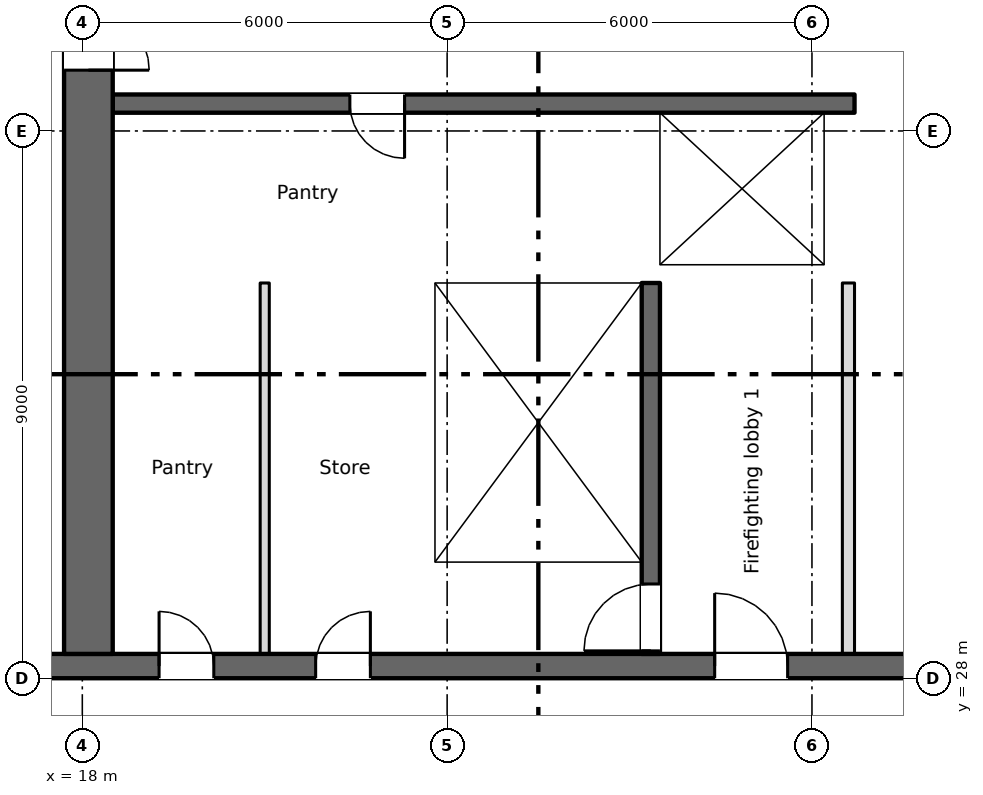
"""IFC4 building model, lengths in metres.
Left out: names, types, materials, properties, quantities, classifications, styles, units other than length and angle.
Written with IfcOpenShell. Run it as: python <this file> out.ifc"""

import sys

from ifc_helpers import new_model, si_unit, direction, frame, frame_2d, origin, place, context, subcontext, project, spatial, rectangle, extrude, element, fill, save


model = new_model("IFC4")
c1 = context("Model", 3, precision=1e-05, world=origin(), true_north=direction((0.0, 1.0)))
c2 = subcontext(c1, "Body", "Model", "MODEL_VIEW")
j1 = project(units=[si_unit("LENGTHUNIT", "METRE"), si_unit("PLANEANGLEUNIT", "RADIAN")], contexts=[c1])
p1 = place(None, origin())
s1 = spatial("IfcSite", under=j1, at=p1, CompositionType="ELEMENT")
p2 = place(p1, origin())
s2 = spatial("IfcBuilding", under=s1, at=p2, CompositionType="ELEMENT")
p3 = place(p2, frame((0.0, 0.0, 155.0)))
s3 = spatial("IfcBuildingStorey", under=s2, at=p3, CompositionType="ELEMENT", Elevation=155.0)
p4 = place(p3, frame((6.7, 28.2, 0.0), z_axis=(0.0, 0.0, 1.0), x_axis=(1.0, 0.0, 0.0)))
e1 = element("IfcWall", 1, at=p4, inside=s3, PredefinedType="SHEAR", context=c2, shape_type="SweptSolid", body=[
    extrude(rectangle(XDim=57.8, YDim=0.4, at=frame_2d((28.9, 0.0))), origin(), (0.0, 0.0, 1.0), 3.15),
])
p5 = place(p4, frame((12.562, 0.0, 0.0)))
e2 = element("IfcOpeningElement", 2, at=p5, cuts=e1, PredefinedType="OPENING", context=c2, shape_type="SweptSolid", body=[
    extrude(rectangle(XDim=0.9, YDim=2.1, at=frame_2d((0.45, 1.05))), frame((0.0, 0.21, 0.0), z_axis=(0.0, -1.0, 0.0), x_axis=(1.0, 0.0, 0.0)), (0.0, 0.0, 1.0), 0.42),
])
p6 = place(p4, frame((15.137, 0.0, 0.0)))
e3 = element("IfcOpeningElement", 3, at=p6, cuts=e1, PredefinedType="OPENING", context=c2, shape_type="SweptSolid", body=[
    extrude(rectangle(XDim=0.9, YDim=2.1, at=frame_2d((0.45, 1.05))), frame((0.0, 0.21, 0.0), z_axis=(0.0, -1.0, 0.0), x_axis=(1.0, 0.0, 0.0)), (0.0, 0.0, 1.0), 0.42),
])
p7 = place(p4, frame((49.85, 0.0, 0.0)))
e4 = element("IfcOpeningElement", 4, at=p7, cuts=e1, PredefinedType="OPENING", context=c2, shape_type="SweptSolid", body=[
    extrude(rectangle(XDim=0.9, YDim=2.1, at=frame_2d((0.45, 1.05))), frame((0.0, 0.21, 0.0), z_axis=(0.0, -1.0, 0.0), x_axis=(1.0, 0.0, 0.0)), (0.0, 0.0, 1.0), 0.42),
])
p8 = place(p4, frame((0.562, 0.0, 0.0)))
e5 = element("IfcOpeningElement", 5, at=p8, cuts=e1, PredefinedType="OPENING", context=c2, shape_type="SweptSolid", body=[
    extrude(rectangle(XDim=0.9, YDim=2.1, at=frame_2d((0.45, 1.05))), frame((0.0, 0.21, 0.0), z_axis=(0.0, -1.0, 0.0), x_axis=(1.0, 0.0, 0.0)), (0.0, 0.0, 1.0), 0.42),
])
p9 = place(p4, frame((2.137, 0.0, 0.0)))
e6 = element("IfcOpeningElement", 6, at=p9, cuts=e1, PredefinedType="OPENING", context=c2, shape_type="SweptSolid", body=[
    extrude(rectangle(XDim=0.9, YDim=2.1, at=frame_2d((0.45, 1.05))), frame((0.0, 0.21, 0.0), z_axis=(0.0, -1.0, 0.0), x_axis=(1.0, 0.0, 0.0)), (0.0, 0.0, 1.0), 0.42),
])
p10 = place(p4, frame((4.7, 0.0, 0.0)))
e7 = element("IfcOpeningElement", 7, at=p10, cuts=e1, PredefinedType="OPENING", context=c2, shape_type="SweptSolid", body=[
    extrude(rectangle(XDim=1.2, YDim=2.1, at=frame_2d((0.6, 1.05))), frame((0.0, 0.21, 0.0), z_axis=(0.0, -1.0, 0.0), x_axis=(1.0, 0.0, 0.0)), (0.0, 0.0, 1.0), 0.42),
])
p11 = place(p4, frame((31.7, 0.0, 0.0)))
e8 = element("IfcOpeningElement", 8, at=p11, cuts=e1, PredefinedType="OPENING", context=c2, shape_type="SweptSolid", body=[
    extrude(rectangle(XDim=1.2, YDim=2.1, at=frame_2d((0.6, 1.05))), frame((0.0, 0.21, 0.0), z_axis=(0.0, -1.0, 0.0), x_axis=(1.0, 0.0, 0.0)), (0.0, 0.0, 1.0), 0.42),
])
p12 = place(p4, frame((55.2, 0.0, 0.0)))
e9 = element("IfcOpeningElement", 9, at=p12, cuts=e1, PredefinedType="OPENING", context=c2, shape_type="SweptSolid", body=[
    extrude(rectangle(XDim=1.2, YDim=2.1, at=frame_2d((0.6, 1.05))), frame((0.0, 0.21, 0.0), z_axis=(0.0, -1.0, 0.0), x_axis=(1.0, 0.0, 0.0)), (0.0, 0.0, 1.0), 0.42),
])
p13 = place(p4, frame((21.7, 0.0, 0.0)))
e10 = element("IfcOpeningElement", 10, at=p13, cuts=e1, PredefinedType="OPENING", context=c2, shape_type="SweptSolid", body=[
    extrude(rectangle(XDim=1.2, YDim=2.1, at=frame_2d((0.6, 1.05))), frame((0.0, 0.21, 0.0), z_axis=(0.0, -1.0, 0.0), x_axis=(1.0, 0.0, 0.0)), (0.0, 0.0, 1.0), 0.42),
])
p14 = place(p4, frame((41.7, 0.0, 0.0)))
e11 = element("IfcOpeningElement", 11, at=p14, cuts=e1, PredefinedType="OPENING", context=c2, shape_type="SweptSolid", body=[
    extrude(rectangle(XDim=1.2, YDim=2.1, at=frame_2d((0.6, 1.05))), frame((0.0, 0.21, 0.0), z_axis=(0.0, -1.0, 0.0), x_axis=(1.0, 0.0, 0.0)), (0.0, 0.0, 1.0), 0.42),
])
p15 = place(p4, frame((24.85, 0.0, 0.0)))
e12 = element("IfcOpeningElement", 12, at=p15, cuts=e1, PredefinedType="OPENING", context=c2, shape_type="SweptSolid", body=[
    extrude(rectangle(XDim=2.4, YDim=2.1, at=frame_2d((1.2, 1.05))), frame((0.0, 0.21, 0.0), z_axis=(0.0, -1.0, 0.0), x_axis=(1.0, 0.0, 0.0)), (0.0, 0.0, 1.0), 0.42),
])
p16 = place(p4, frame((37.35, 0.0, 0.0)))
e13 = element("IfcOpeningElement", 13, at=p16, cuts=e1, PredefinedType="OPENING", context=c2, shape_type="SweptSolid", body=[
    extrude(rectangle(XDim=2.4, YDim=2.1, at=frame_2d((1.2, 1.05))), frame((0.0, 0.21, 0.0), z_axis=(0.0, -1.0, 0.0), x_axis=(1.0, 0.0, 0.0)), (0.0, 0.0, 1.0), 0.42),
])
p17 = place(p4, frame((7.95, 0.0, 0.0)))
e14 = element("IfcOpeningElement", 14, at=p17, cuts=e1, PredefinedType="OPENING", context=c2, shape_type="SweptSolid", body=[
    extrude(rectangle(XDim=2.4, YDim=2.1, at=frame_2d((1.2, 1.05))), frame((0.0, 0.21, 0.0), z_axis=(0.0, -1.0, 0.0), x_axis=(1.0, 0.0, 0.0)), (0.0, 0.0, 1.0), 0.42),
])
p18 = place(p4, frame((28.85, 0.0, 0.0)))
e15 = element("IfcOpeningElement", 15, at=p18, cuts=e1, PredefinedType="OPENING", context=c2, shape_type="SweptSolid", body=[
    extrude(rectangle(XDim=0.9, YDim=2.1, at=frame_2d((0.45, 1.05))), frame((0.0, 0.21, 0.0), z_axis=(0.0, -1.0, 0.0), x_axis=(1.0, 0.0, 0.0)), (0.0, 0.0, 1.0), 0.42),
])
p19 = place(p4, frame((34.85, 0.0, 0.0)))
e16 = element("IfcOpeningElement", 16, at=p19, cuts=e1, PredefinedType="OPENING", context=c2, shape_type="SweptSolid", body=[
    extrude(rectangle(XDim=0.9, YDim=2.1, at=frame_2d((0.45, 1.05))), frame((0.0, 0.21, 0.0), z_axis=(0.0, -1.0, 0.0), x_axis=(1.0, 0.0, 0.0)), (0.0, 0.0, 1.0), 0.42),
])
p20 = place(p3, frame((18.1, 28.4, 0.0), z_axis=(0.0, 0.0, 1.0), x_axis=(0.0, 1.0, 0.0)))
e17 = element("IfcWall", 17, at=p20, inside=s3, PredefinedType="SHEAR", context=c2, shape_type="SweptSolid", body=[
    extrude(rectangle(XDim=16.8, YDim=0.8, at=frame_2d((8.4, 0.0))), origin(), (0.0, 0.0, 1.0), 3.15),
])
p21 = place(p20, frame((9.6, 0.0, 0.0)))
e18 = element("IfcOpeningElement", 18, at=p21, cuts=e17, PredefinedType="OPENING", context=c2, shape_type="SweptSolid", body=[
    extrude(rectangle(XDim=2.0, YDim=2.1, at=frame_2d((1.0, 1.05))), frame((0.0, 0.41, 0.0), z_axis=(0.0, -1.0, 0.0), x_axis=(1.0, 0.0, 0.0)), (0.0, 0.0, 1.0), 0.82),
])
p22 = place(p20, frame((15.35, 0.0, 0.0)))
e19 = element("IfcOpeningElement", 19, at=p22, cuts=e17, PredefinedType="OPENING", context=c2, shape_type="SweptSolid", body=[
    extrude(rectangle(XDim=1.2, YDim=2.1, at=frame_2d((0.6, 1.05))), frame((0.0, 0.41, 0.0), z_axis=(0.0, -1.0, 0.0), x_axis=(1.0, 0.0, 0.0)), (0.0, 0.0, 1.0), 0.82),
])
p23 = place(p3, frame((23.65, 28.4, 0.0), z_axis=(0.0, 0.0, 1.0), x_axis=(0.0, 1.0, 0.0)))
e20 = element("IfcWall", 20, at=p23, inside=s3, PredefinedType="SHEAR", context=c2, shape_type="SweptSolid", body=[
    extrude(rectangle(XDim=6.1, YDim=0.3, at=frame_2d((3.05, 0.0))), origin(), (0.0, 0.0, 1.0), 3.15),
])
p24 = place(p3, frame((27.35, 28.4, 0.0), z_axis=(0.0, 0.0, 1.0), x_axis=(0.0, 1.0, 0.0)))
e21 = element("IfcWall", 21, at=p24, inside=s3, PredefinedType="SHEAR", context=c2, shape_type="SweptSolid", body=[
    extrude(rectangle(XDim=6.1, YDim=0.3, at=frame_2d((3.05, 0.0))), origin(), (0.0, 0.0, 1.0), 3.15),
])
p25 = place(p24, frame((0.05, 0.0, 0.0)))
e22 = element("IfcOpeningElement", 22, at=p25, cuts=e21, PredefinedType="OPENING", context=c2, shape_type="SweptSolid", body=[
    extrude(rectangle(XDim=1.1, YDim=2.1, at=frame_2d((0.55, 1.05))), frame((0.0, 0.16, 0.0), z_axis=(0.0, -1.0, 0.0), x_axis=(1.0, 0.0, 0.0)), (0.0, 0.0, 1.0), 0.32),
])
p26 = place(p3, frame((18.5, 34.65, 0.0), z_axis=(0.0, 0.0, 1.0), x_axis=(1.0, 0.0, 0.0)))
e23 = element("IfcWall", 23, at=p26, inside=s3, PredefinedType="SHEAR", context=c2, shape_type="SweptSolid", body=[
    extrude(rectangle(XDim=12.2, YDim=0.3, at=frame_2d((6.1, 0.0))), origin(), (0.0, 0.0, 1.0), 3.15),
])
p27 = place(p26, frame((9.8, 0.0, 0.0)))
e24 = element("IfcOpeningElement", 24, at=p27, cuts=e23, PredefinedType="OPENING", context=c2, shape_type="SweptSolid", body=[
    extrude(rectangle(XDim=1.1, YDim=2.1, at=frame_2d((0.55, 1.05))), frame((0.0, 0.16, 0.0), z_axis=(0.0, -1.0, 0.0), x_axis=(1.0, 0.0, 0.0)), (0.0, 0.0, 1.0), 0.32),
])
p28 = place(p3, frame((30.7, 37.45, 0.0), z_axis=(0.0, 0.0, 1.0), x_axis=(-1.0, 0.0, 0.0)))
e25 = element("IfcWall", 25, at=p28, inside=s3, PredefinedType="SHEAR", context=c2, shape_type="SweptSolid", body=[
    extrude(rectangle(XDim=12.2, YDim=0.3, at=frame_2d((6.1, 0.0))), origin(), (0.0, 0.0, 1.0), 3.15),
])
p29 = place(p28, frame((7.4, 0.0, 0.0)))
e26 = element("IfcOpeningElement", 26, at=p29, cuts=e25, PredefinedType="OPENING", context=c2, shape_type="SweptSolid", body=[
    extrude(rectangle(XDim=0.9, YDim=2.1, at=frame_2d((0.45, 1.05))), frame((0.0, 0.16, 0.0), z_axis=(0.0, -1.0, 0.0), x_axis=(1.0, 0.0, 0.0)), (0.0, 0.0, 1.0), 0.32),
])
p30 = place(p3, frame((27.35, 34.8, 0.0), z_axis=(0.0, 0.0, 1.0), x_axis=(0.0, 1.0, 0.0)))
e27 = element("IfcWall", 27, at=p30, inside=s3, PredefinedType="SHEAR", context=c2, shape_type="SweptSolid", body=[
    extrude(rectangle(XDim=2.5, YDim=0.3, at=frame_2d((1.25, 0.0))), origin(), (0.0, 0.0, 1.0), 3.15),
])
p31 = place(p3, frame((30.45, 34.8, 0.0), z_axis=(0.0, 0.0, 1.0), x_axis=(0.0, 1.0, 0.0)))
e28 = element("IfcWall", 28, at=p31, inside=s3, PredefinedType="SHEAR", context=c2, shape_type="SweptSolid", body=[
    extrude(rectangle(XDim=2.5, YDim=0.5, at=frame_2d((1.25, 0.0))), origin(), (0.0, 0.0, 1.0), 3.15),
])
p32 = place(p3, frame((30.6, 28.4, 0.0), z_axis=(0.0, 0.0, 1.0), x_axis=(0.0, 1.0, 0.0)))
e29 = element("IfcWall", 29, at=p32, inside=s3, PredefinedType="PARTITIONING", context=c2, shape_type="SweptSolid", body=[
    extrude(rectangle(XDim=6.1, YDim=0.2, at=frame_2d((3.05, 0.0))), origin(), (0.0, 0.0, 1.0), 3.15),
])
p33 = place(p3, frame((21.0, 28.4, 0.0), z_axis=(0.0, 0.0, 1.0), x_axis=(0.0, 1.0, 0.0)))
e30 = element("IfcWall", 30, at=p33, inside=s3, PredefinedType="PARTITIONING", context=c2, shape_type="SweptSolid", body=[
    extrude(rectangle(XDim=6.1, YDim=0.15, at=frame_2d((3.05, 0.0))), origin(), (0.0, 0.0, 1.0), 3.15),
])
p34 = place(p5, origin())
e31 = element("IfcDoor", 31, at=p34, inside=s3, OperationType="SINGLE_SWING_LEFT", PredefinedType="DOOR", context=c2, shape_type="SweptSolid", body=[
    extrude(rectangle(XDim=0.9, YDim=2.1, at=frame_2d((0.45, 1.05))), frame((0.0, 0.025, 0.0), z_axis=(0.0, -1.0, 0.0), x_axis=(1.0, 0.0, 0.0)), (0.0, 0.0, 1.0), 0.05),
])
fill(e2, e31)
p35 = place(p6, origin())
e32 = element("IfcDoor", 32, at=p35, inside=s3, OperationType="SINGLE_SWING_RIGHT", PredefinedType="DOOR", context=c2, shape_type="SweptSolid", body=[
    extrude(rectangle(XDim=0.9, YDim=2.1, at=frame_2d((0.45, 1.05))), frame((0.0, 0.025, 0.0), z_axis=(0.0, -1.0, 0.0), x_axis=(1.0, 0.0, 0.0)), (0.0, 0.0, 1.0), 0.05),
])
fill(e3, e32)
p36 = place(p29, origin())
e33 = element("IfcDoor", 33, at=p36, inside=s3, OperationType="SINGLE_SWING_LEFT", PredefinedType="DOOR", context=c2, shape_type="SweptSolid", body=[
    extrude(rectangle(XDim=0.9, YDim=2.1, at=frame_2d((0.45, 1.05))), frame((0.0, 0.025, 0.0), z_axis=(0.0, -1.0, 0.0), x_axis=(1.0, 0.0, 0.0)), (0.0, 0.0, 1.0), 0.05),
])
fill(e26, e33)
p37 = place(p27, origin())
e34 = element("IfcDoor", 34, at=p37, inside=s3, OperationType="SLIDING_TO_LEFT", PredefinedType="DOOR", context=c2, shape_type="SweptSolid", body=[
    extrude(rectangle(XDim=1.1, YDim=2.1, at=frame_2d((0.55, 1.05))), frame((0.0, 0.025, 0.0), z_axis=(0.0, -1.0, 0.0), x_axis=(1.0, 0.0, 0.0)), (0.0, 0.0, 1.0), 0.05),
])
fill(e24, e34)
p38 = place(p25, origin())
e35 = element("IfcDoor", 35, at=p38, inside=s3, OperationType="SINGLE_SWING_LEFT", PredefinedType="DOOR", context=c2, shape_type="SweptSolid", body=[
    extrude(rectangle(XDim=1.1, YDim=2.1, at=frame_2d((0.55, 1.05))), frame((0.0, 0.025, 0.0), z_axis=(0.0, -1.0, 0.0), x_axis=(1.0, 0.0, 0.0)), (0.0, 0.0, 1.0), 0.05),
])
fill(e22, e35)
p39 = place(p13, origin())
e36 = element("IfcDoor", 36, at=p39, inside=s3, OperationType="SINGLE_SWING_LEFT", PredefinedType="DOOR", context=c2, shape_type="SweptSolid", body=[
    extrude(rectangle(XDim=1.2, YDim=2.1, at=frame_2d((0.6, 1.05))), frame((0.0, 0.025, 0.0), z_axis=(0.0, -1.0, 0.0), x_axis=(1.0, 0.0, 0.0)), (0.0, 0.0, 1.0), 0.05),
])
fill(e10, e36)
p40 = place(p21, origin())
e37 = element("IfcDoor", 37, at=p40, inside=s3, OperationType="DOUBLE_DOOR_SINGLE_SWING", PredefinedType="DOOR", context=c2, shape_type="SweptSolid", body=[
    extrude(rectangle(XDim=2.0, YDim=2.1, at=frame_2d((1.0, 1.05))), frame((0.0, 0.025, 0.0), z_axis=(0.0, -1.0, 0.0), x_axis=(1.0, 0.0, 0.0)), (0.0, 0.0, 1.0), 0.05),
])
fill(e18, e37)
save(model, sys.argv[1])
